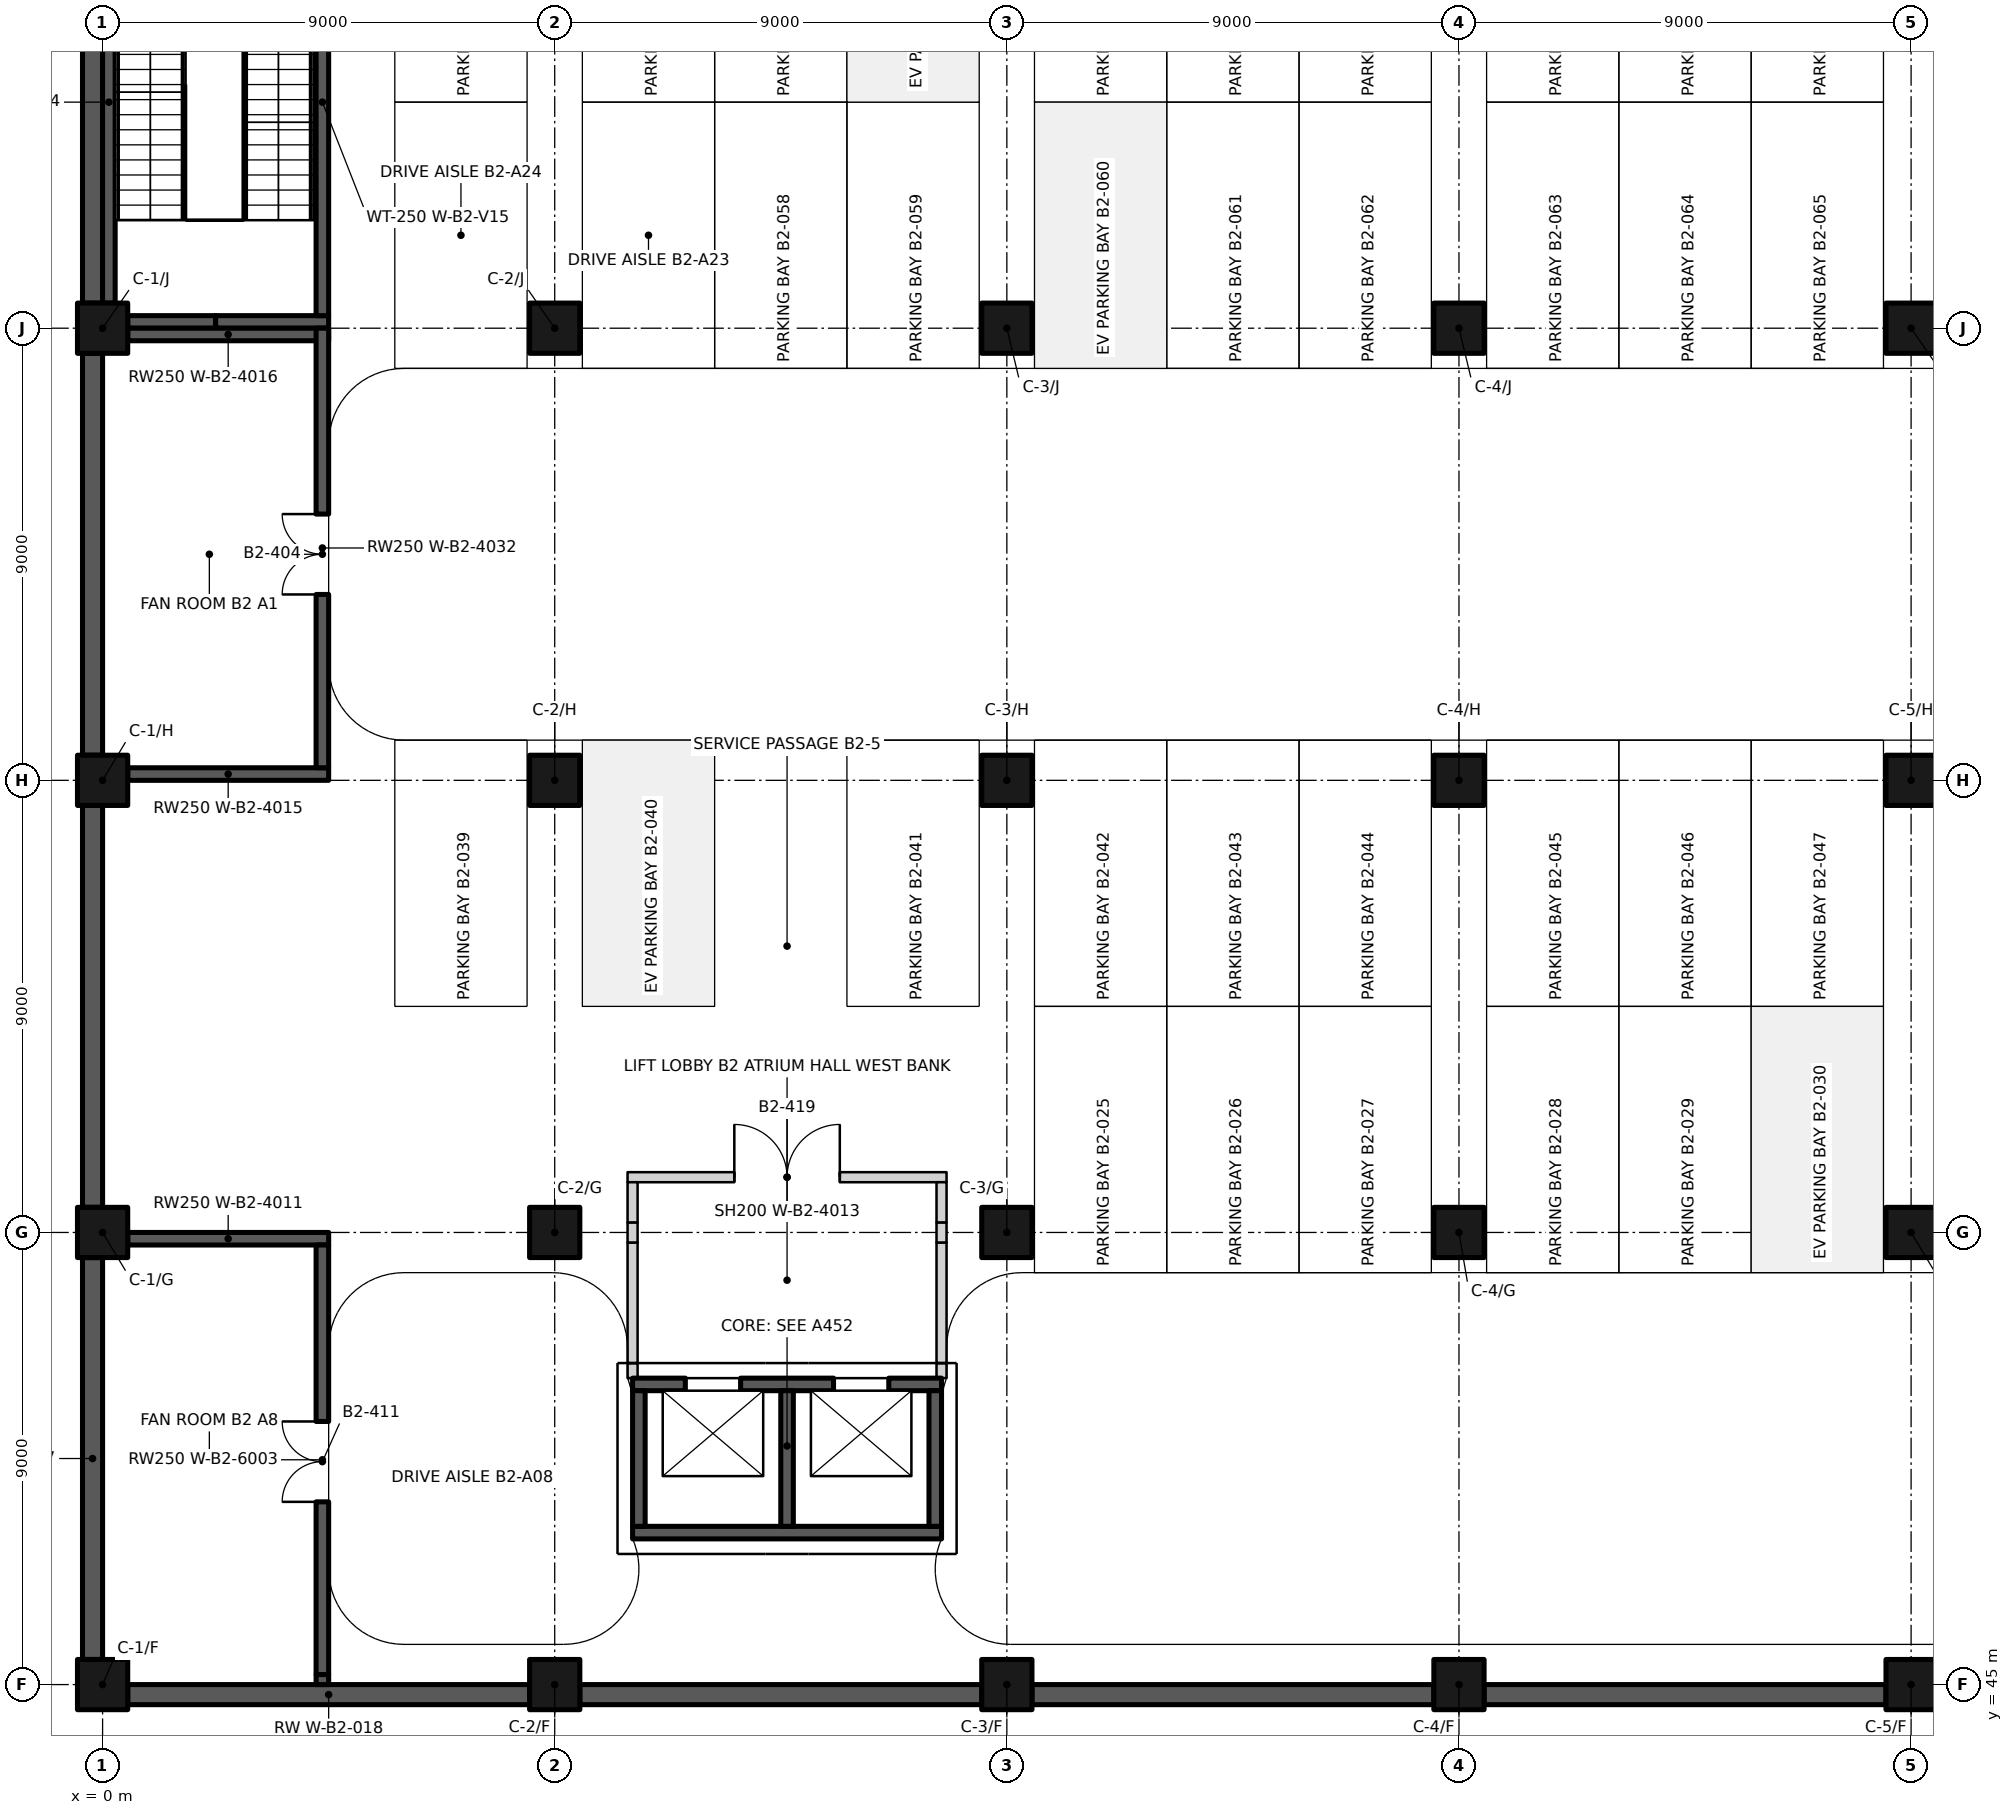
"""IFC4 building model, lengths in metres.
Left out: names, types, materials, properties, quantities, classifications, styles, units other than length and angle.
Written with IfcOpenShell. Run it as: python <this file> out.ifc"""

import sys

from ifc_helpers import new_model, si_unit, direction, frame, frame_2d, origin, origin_2d, place, context, subcontext, project, spatial, rectangle, extrude, element, fill, save


model = new_model("IFC4")
c1 = context("Model", 3, precision=1e-05, world=origin(), true_north=direction((0.0, 1.0)))
c2 = subcontext(c1, "Body", "Model", "MODEL_VIEW")
j1 = project(units=[si_unit("LENGTHUNIT", "METRE"), si_unit("PLANEANGLEUNIT", "RADIAN")], contexts=[c1])
p1 = place(None, origin())
s1 = spatial("IfcSite", under=j1, at=p1, CompositionType="ELEMENT")
p2 = place(p1, origin())
s2 = spatial("IfcBuilding", under=s1, at=p2, CompositionType="ELEMENT")
p3 = place(p2, frame((0.0, 0.0, -9.9)))
s3 = spatial("IfcBuildingStorey", under=s2, at=p3, CompositionType="ELEMENT", Elevation=-9.9)
for number, where, z_axis, x_axis in (
    (1, (0.5, 44.8, -0.5), (0.0, 0.0, 1.0), (1.0, 0.0, 0.0)),
    (2, (9.5, 44.8, -0.5), (0.0, 0.0, 1.0), (1.0, 0.0, 0.0)),
    (3, (18.5, 44.8, -0.5), (0.0, 0.0, 1.0), (1.0, 0.0, 0.0)),
    (4, (27.5, 44.8, -0.5), (0.0, 0.0, 1.0), (1.0, 0.0, 0.0)),
    (5, (-0.2, 45.5, -0.5), (0.0, 0.0, 1.0), (0.0, 1.0, 0.0)),
    (6, (-0.2, 54.5, -0.5), (0.0, 0.0, 1.0), (0.0, 1.0, 0.0)),
    (7, (-0.2, 63.5, -0.5), (0.0, 0.0, 1.0), (0.0, 1.0, 0.0)),
    (8, (-0.2, 72.5, -0.5), (0.0, 0.0, 1.0), (0.0, 1.0, 0.0)),
):
    element("IfcWall", number, at=place(p3, frame(where, z_axis=z_axis, x_axis=x_axis)), inside=s3, PredefinedType="SOLIDWALL", context=c2, shape_type="SweptSolid", body=[
        extrude(rectangle(XDim=8.0, YDim=0.4, at=frame_2d((4.0, 0.0))), origin(), (0.0, 0.0, 1.0), 5.3),
    ])
for number, where, z_axis, x_axis in (
    (9, (0.0, 45.0, 0.0), (0.0, 0.0, 1.0), (1.0, 0.0, 0.0)),
    (10, (9.0, 45.0, 0.0), (0.0, 0.0, 1.0), (1.0, 0.0, 0.0)),
    (11, (18.0, 45.0, 0.0), (0.0, 0.0, 1.0), (1.0, 0.0, 0.0)),
    (12, (27.0, 45.0, 0.0), (0.0, 0.0, 1.0), (1.0, 0.0, 0.0)),
    (13, (36.0, 45.0, 0.0), (0.0, 0.0, 1.0), (1.0, 0.0, 0.0)),
    (14, (0.0, 54.0, 0.0), (0.0, 0.0, 1.0), (1.0, 0.0, 0.0)),
    (15, (9.0, 54.0, 0.0), (0.0, 0.0, 1.0), (1.0, 0.0, 0.0)),
    (16, (18.0, 54.0, 0.0), (0.0, 0.0, 1.0), (1.0, 0.0, 0.0)),
    (17, (27.0, 54.0, 0.0), (0.0, 0.0, 1.0), (1.0, 0.0, 0.0)),
    (18, (36.0, 54.0, 0.0), (0.0, 0.0, 1.0), (1.0, 0.0, 0.0)),
    (19, (0.0, 63.0, 0.0), (0.0, 0.0, 1.0), (1.0, 0.0, 0.0)),
    (20, (9.0, 63.0, 0.0), (0.0, 0.0, 1.0), (1.0, 0.0, 0.0)),
    (21, (18.0, 63.0, 0.0), (0.0, 0.0, 1.0), (1.0, 0.0, 0.0)),
    (22, (27.0, 63.0, 0.0), (0.0, 0.0, 1.0), (1.0, 0.0, 0.0)),
    (23, (36.0, 63.0, 0.0), (0.0, 0.0, 1.0), (1.0, 0.0, 0.0)),
    (24, (0.0, 72.0, 0.0), (0.0, 0.0, 1.0), (1.0, 0.0, 0.0)),
    (25, (9.0, 72.0, 0.0), (0.0, 0.0, 1.0), (1.0, 0.0, 0.0)),
    (26, (18.0, 72.0, 0.0), (0.0, 0.0, 1.0), (1.0, 0.0, 0.0)),
    (27, (27.0, 72.0, 0.0), (0.0, 0.0, 1.0), (1.0, 0.0, 0.0)),
    (28, (36.0, 72.0, 0.0), (0.0, 0.0, 1.0), (1.0, 0.0, 0.0)),
):
    element("IfcColumn", number, at=place(p3, frame(where, z_axis=z_axis, x_axis=x_axis)), inside=s3, PredefinedType="COLUMN", context=c2, shape_type="SweptSolid", body=[
        extrude(rectangle(XDim=1.0, YDim=1.0, at=origin_2d()), origin(), (0.0, 0.0, 1.0), 4.8),
    ])
p4 = place(p3, frame((0.5, 72.125, 0.0), z_axis=(0.0, 0.0, 1.0), x_axis=(1.0, 0.0, 0.0)))
e29 = element("IfcWall", 29, at=p4, inside=s3, PredefinedType="SHEAR", context=c2, shape_type="SweptSolid", body=[
    extrude(rectangle(XDim=1.75, YDim=0.25, at=frame_2d((0.875, 0.0))), origin(), (0.0, 0.0, 1.0), 4.8),
])
p5 = place(p3, frame((2.25, 72.125, 0.0), z_axis=(0.0, 0.0, 1.0), x_axis=(1.0, 0.0, 0.0)))
e30 = element("IfcWall", 30, at=p5, inside=s3, PredefinedType="SHEAR", context=c2, shape_type="SweptSolid", body=[
    extrude(rectangle(XDim=2.25, YDim=0.25, at=frame_2d((1.125, 0.0))), origin(), (0.0, 0.0, 1.0), 4.8),
])
p6 = place(p3, frame((0.125, 72.5, 0.0), z_axis=(0.0, 0.0, 1.0), x_axis=(0.0, 1.0, 0.0)))
e31 = element("IfcWall", 31, at=p6, inside=s3, PredefinedType="SHEAR", context=c2, shape_type="SweptSolid", body=[
    extrude(rectangle(XDim=8.0, YDim=0.25, at=frame_2d((4.0, 0.0))), origin(), (0.0, 0.0, 1.0), 4.8),
])
p7 = place(p3, frame((4.375, 72.25, 0.0), z_axis=(0.0, 0.0, 1.0), x_axis=(0.0, 1.0, 0.0)))
e32 = element("IfcWall", 32, at=p7, inside=s3, PredefinedType="SHEAR", context=c2, shape_type="SweptSolid", body=[
    extrude(rectangle(XDim=8.5, YDim=0.25, at=frame_2d((4.25, 0.0))), origin(), (0.0, 0.0, 1.0), 4.8),
])
p8 = place(p7, frame((8.0, 0.0, 0.0), z_axis=(0.0, 0.0, 1.0), x_axis=(-1.0, 0.0, 0.0)))
e33 = element("IfcOpeningElement", 33, at=p8, cuts=e32, PredefinedType="OPENING", context=c2, shape_type="SweptSolid", body=[
    extrude(rectangle(XDim=1.1, YDim=2.1, at=frame_2d((0.55, 1.05))), frame((0.0, 0.135, 0.0), z_axis=(0.0, -1.0, 0.0), x_axis=(1.0, 0.0, 0.0)), (0.0, 0.0, 1.0), 0.27),
])
p9 = place(p3, frame((10.55, 50.975, -1.6), z_axis=(0.0, 0.0, 1.0), x_axis=(1.0, 0.0, 0.0)))
e34 = element("IfcWall", 34, at=p9, inside=s3, PredefinedType="SHEAR", context=c2, shape_type="SweptSolid", body=[
    extrude(rectangle(XDim=6.15, YDim=0.25, at=frame_2d((3.075, 0.0))), origin(), (0.0, 0.0, 1.0), 6.4),
])
p10 = place(p9, frame((1.05, 0.0, 1.6)))
e35 = element("IfcOpeningElement", 35, at=p10, cuts=e34, PredefinedType="OPENING", context=c2, shape_type="SweptSolid", body=[
    extrude(rectangle(XDim=1.1, YDim=2.1, at=frame_2d((0.55, 1.05))), frame((0.0, 0.135, 0.0), z_axis=(0.0, -1.0, 0.0), x_axis=(1.0, 0.0, 0.0)), (0.0, 0.0, 1.0), 0.27),
])
p11 = place(p9, frame((4.0, 0.0, 1.6)))
e36 = element("IfcOpeningElement", 36, at=p11, cuts=e34, PredefinedType="OPENING", context=c2, shape_type="SweptSolid", body=[
    extrude(rectangle(XDim=1.1, YDim=2.1, at=frame_2d((0.55, 1.05))), frame((0.0, 0.135, 0.0), z_axis=(0.0, -1.0, 0.0), x_axis=(1.0, 0.0, 0.0)), (0.0, 0.0, 1.0), 0.27),
])
p12 = place(p3, frame((10.55, 48.025, -1.6), z_axis=(0.0, 0.0, 1.0), x_axis=(1.0, 0.0, 0.0)))
e37 = element("IfcWall", 37, at=p12, inside=s3, PredefinedType="SHEAR", context=c2, shape_type="SweptSolid", body=[
    extrude(rectangle(XDim=6.15, YDim=0.25, at=frame_2d((3.075, 0.0))), origin(), (0.0, 0.0, 1.0), 6.4),
])
for number, where, z_axis, x_axis in (
    (38, (10.675, 48.15, -1.6), (0.0, 0.0, 1.0), (0.0, 1.0, 0.0)),
    (39, (13.625, 48.15, -1.6), (0.0, 0.0, 1.0), (0.0, 1.0, 0.0)),
    (40, (16.575, 48.15, -1.6), (0.0, 0.0, 1.0), (0.0, 1.0, 0.0)),
):
    element("IfcWall", number, at=place(p3, frame(where, z_axis=z_axis, x_axis=x_axis)), inside=s3, PredefinedType="SHEAR", context=c2, shape_type="SweptSolid", body=[
        extrude(rectangle(XDim=2.7, YDim=0.25, at=frame_2d((1.35, 0.0))), origin(), (0.0, 0.0, 1.0), 6.4),
    ])
p13 = place(p3, frame((0.5, 53.875, 0.0), z_axis=(0.0, 0.0, 1.0), x_axis=(1.0, 0.0, 0.0)))
e41 = element("IfcWall", 41, at=p13, inside=s3, PredefinedType="SOLIDWALL", context=c2, shape_type="SweptSolid", body=[
    extrude(rectangle(XDim=4.0, YDim=0.25, at=frame_2d((2.0, 0.0))), origin(), (0.0, 0.0, 1.0), 4.5),
])
p14 = place(p3, frame((10.45, 55.1, 0.0), z_axis=(0.0, 0.0, 1.0), x_axis=(1.0, 0.0, 0.0)))
e42 = element("IfcWall", 42, at=p14, inside=s3, PredefinedType="PARTITIONING", context=c2, shape_type="SweptSolid", body=[
    extrude(rectangle(XDim=6.35, YDim=0.2, at=frame_2d((3.175, 0.0))), origin(), (0.0, 0.0, 1.0), 4.5),
])
p15 = place(p14, frame((2.125, 0.0, 0.0)))
e43 = element("IfcOpeningElement", 43, at=p15, cuts=e42, PredefinedType="OPENING", context=c2, shape_type="SweptSolid", body=[
    extrude(rectangle(XDim=2.1, YDim=2.4, at=frame_2d((1.05, 1.2))), frame((0.0, 0.11, 0.0), z_axis=(0.0, -1.0, 0.0), x_axis=(1.0, 0.0, 0.0)), (0.0, 0.0, 1.0), 0.22),
])
for number, where, z_axis, x_axis in (
    (44, (0.5, 63.125, 0.0), (0.0, 0.0, 1.0), (1.0, 0.0, 0.0)),
    (45, (0.5, 71.875, 0.0), (0.0, 0.0, 1.0), (1.0, 0.0, 0.0)),
):
    element("IfcWall", number, at=place(p3, frame(where, z_axis=z_axis, x_axis=x_axis)), inside=s3, PredefinedType="SOLIDWALL", context=c2, shape_type="SweptSolid", body=[
        extrude(rectangle(XDim=4.0, YDim=0.25, at=frame_2d((2.0, 0.0))), origin(), (0.0, 0.0, 1.0), 4.5),
    ])
p16 = place(p3, frame((4.375, 45.0, 0.0), z_axis=(0.0, 0.0, 1.0), x_axis=(0.0, 1.0, 0.0)))
e46 = element("IfcWall", 46, at=p16, inside=s3, PredefinedType="SOLIDWALL", context=c2, shape_type="SweptSolid", body=[
    extrude(rectangle(XDim=0.2, YDim=0.25, at=frame_2d((0.1, 0.0))), origin(), (0.0, 0.0, 1.0), 4.0),
])
p17 = place(p3, frame((4.375, 45.2, 0.0), z_axis=(0.0, 0.0, 1.0), x_axis=(0.0, 1.0, 0.0)))
e47 = element("IfcWall", 47, at=p17, inside=s3, PredefinedType="SOLIDWALL", context=c2, shape_type="SweptSolid", body=[
    extrude(rectangle(XDim=8.55, YDim=0.25, at=frame_2d((4.275, 0.0))), origin(), (0.0, 0.0, 1.0), 4.5),
])
p18 = place(p17, frame((3.438, 0.0, 0.0)))
e48 = element("IfcOpeningElement", 48, at=p18, cuts=e47, PredefinedType="OPENING", context=c2, shape_type="SweptSolid", body=[
    extrude(rectangle(XDim=1.6, YDim=2.1, at=frame_2d((0.8, 1.05))), frame((0.0, 0.135, 0.0), z_axis=(0.0, -1.0, 0.0), x_axis=(1.0, 0.0, 0.0)), (0.0, 0.0, 1.0), 0.27),
])
p19 = place(p3, frame((4.375, 63.25, 0.0), z_axis=(0.0, 0.0, 1.0), x_axis=(0.0, 1.0, 0.0)))
e49 = element("IfcWall", 49, at=p19, inside=s3, PredefinedType="SOLIDWALL", context=c2, shape_type="SweptSolid", body=[
    extrude(rectangle(XDim=8.75, YDim=0.25, at=frame_2d((4.375, 0.0))), origin(), (0.0, 0.0, 1.0), 4.5),
])
p20 = place(p19, frame((3.45, 0.0, 0.0)))
e50 = element("IfcOpeningElement", 50, at=p20, cuts=e49, PredefinedType="OPENING", context=c2, shape_type="SweptSolid", body=[
    extrude(rectangle(XDim=1.6, YDim=2.1, at=frame_2d((0.8, 1.05))), frame((0.0, 0.135, 0.0), z_axis=(0.0, -1.0, 0.0), x_axis=(1.0, 0.0, 0.0)), (0.0, 0.0, 1.0), 0.27),
])
p21 = place(p3, frame((10.55, 51.1, 0.0), z_axis=(0.0, 0.0, 1.0), x_axis=(0.0, 1.0, 0.0)))
e51 = element("IfcWall", 51, at=p21, inside=s3, PredefinedType="PARTITIONING", context=c2, shape_type="SweptSolid", body=[
    extrude(rectangle(XDim=0.3, YDim=0.2, at=frame_2d((0.15, 0.0))), origin(), (0.0, 0.0, 1.0), 4.2),
])
p22 = place(p3, frame((10.55, 51.4, 0.0), z_axis=(0.0, 0.0, 1.0), x_axis=(0.0, 1.0, 0.0)))
e52 = element("IfcWall", 52, at=p22, inside=s3, PredefinedType="PARTITIONING", context=c2, shape_type="SweptSolid", body=[
    extrude(rectangle(XDim=2.4, YDim=0.2, at=frame_2d((1.2, 0.0))), origin(), (0.0, 0.0, 1.0), 4.5),
])
p23 = place(p3, frame((10.55, 53.8, 0.0), z_axis=(0.0, 0.0, 1.0), x_axis=(0.0, 1.0, 0.0)))
e53 = element("IfcWall", 53, at=p23, inside=s3, PredefinedType="PARTITIONING", context=c2, shape_type="SweptSolid", body=[
    extrude(rectangle(XDim=0.4, YDim=0.2, at=frame_2d((0.2, 0.0))), origin(), (0.0, 0.0, 1.0), 4.0),
])
p24 = place(p3, frame((10.55, 54.2, 0.0), z_axis=(0.0, 0.0, 1.0), x_axis=(0.0, 1.0, 0.0)))
e54 = element("IfcWall", 54, at=p24, inside=s3, PredefinedType="PARTITIONING", context=c2, shape_type="SweptSolid", body=[
    extrude(rectangle(XDim=0.8, YDim=0.2, at=frame_2d((0.4, 0.0))), origin(), (0.0, 0.0, 1.0), 4.5),
])
p25 = place(p3, frame((16.7, 51.1, 0.0), z_axis=(0.0, 0.0, 1.0), x_axis=(0.0, 1.0, 0.0)))
e55 = element("IfcWall", 55, at=p25, inside=s3, PredefinedType="PARTITIONING", context=c2, shape_type="SweptSolid", body=[
    extrude(rectangle(XDim=0.3, YDim=0.2, at=frame_2d((0.15, 0.0))), origin(), (0.0, 0.0, 1.0), 4.2),
])
p26 = place(p3, frame((16.7, 51.4, 0.0), z_axis=(0.0, 0.0, 1.0), x_axis=(0.0, 1.0, 0.0)))
e56 = element("IfcWall", 56, at=p26, inside=s3, PredefinedType="PARTITIONING", context=c2, shape_type="SweptSolid", body=[
    extrude(rectangle(XDim=2.4, YDim=0.2, at=frame_2d((1.2, 0.0))), origin(), (0.0, 0.0, 1.0), 4.5),
])
p27 = place(p3, frame((16.7, 53.8, 0.0), z_axis=(0.0, 0.0, 1.0), x_axis=(0.0, 1.0, 0.0)))
e57 = element("IfcWall", 57, at=p27, inside=s3, PredefinedType="PARTITIONING", context=c2, shape_type="SweptSolid", body=[
    extrude(rectangle(XDim=0.4, YDim=0.2, at=frame_2d((0.2, 0.0))), origin(), (0.0, 0.0, 1.0), 4.0),
])
p28 = place(p3, frame((16.7, 54.2, 0.0), z_axis=(0.0, 0.0, 1.0), x_axis=(0.0, 1.0, 0.0)))
e58 = element("IfcWall", 58, at=p28, inside=s3, PredefinedType="PARTITIONING", context=c2, shape_type="SweptSolid", body=[
    extrude(rectangle(XDim=0.8, YDim=0.2, at=frame_2d((0.4, 0.0))), origin(), (0.0, 0.0, 1.0), 4.5),
])
p29 = place(p10, origin())
e59 = element("IfcDoor", 59, at=p29, inside=s3, OperationType="DOUBLE_DOOR_SLIDING", PredefinedType="DOOR", context=c2, shape_type="SweptSolid", body=[
    extrude(rectangle(XDim=1.1, YDim=2.1, at=frame_2d((0.55, 1.05))), frame((0.0, 0.025, 0.0), z_axis=(0.0, -1.0, 0.0), x_axis=(1.0, 0.0, 0.0)), (0.0, 0.0, 1.0), 0.05),
])
fill(e35, e59)
p30 = place(p11, origin())
e60 = element("IfcDoor", 60, at=p30, inside=s3, OperationType="DOUBLE_DOOR_SLIDING", PredefinedType="DOOR", context=c2, shape_type="SweptSolid", body=[
    extrude(rectangle(XDim=1.1, YDim=2.1, at=frame_2d((0.55, 1.05))), frame((0.0, 0.025, 0.0), z_axis=(0.0, -1.0, 0.0), x_axis=(1.0, 0.0, 0.0)), (0.0, 0.0, 1.0), 0.05),
])
fill(e36, e60)
p31 = place(p20, origin())
e61 = element("IfcDoor", 61, at=p31, inside=s3, OperationType="DOUBLE_DOOR_SINGLE_SWING", PredefinedType="DOOR", context=c2, shape_type="SweptSolid", body=[
    extrude(rectangle(XDim=1.6, YDim=2.1, at=frame_2d((0.8, 1.05))), frame((0.0, 0.025, 0.0), z_axis=(0.0, -1.0, 0.0), x_axis=(1.0, 0.0, 0.0)), (0.0, 0.0, 1.0), 0.05),
])
fill(e50, e61)
p32 = place(p18, origin())
e62 = element("IfcDoor", 62, at=p32, inside=s3, OperationType="DOUBLE_DOOR_SINGLE_SWING", PredefinedType="DOOR", context=c2, shape_type="SweptSolid", body=[
    extrude(rectangle(XDim=1.6, YDim=2.1, at=frame_2d((0.8, 1.05))), frame((0.0, 0.025, 0.0), z_axis=(0.0, -1.0, 0.0), x_axis=(1.0, 0.0, 0.0)), (0.0, 0.0, 1.0), 0.05),
])
fill(e48, e62)
p33 = place(p15, origin())
e63 = element("IfcDoor", 63, at=p33, inside=s3, OperationType="DOUBLE_DOOR_SINGLE_SWING", PredefinedType="DOOR", context=c2, shape_type="SweptSolid", body=[
    extrude(rectangle(XDim=2.1, YDim=2.4, at=frame_2d((1.05, 1.2))), frame((0.0, 0.025, 0.0), z_axis=(0.0, -1.0, 0.0), x_axis=(1.0, 0.0, 0.0)), (0.0, 0.0, 1.0), 0.05),
])
fill(e43, e63)
save(model, sys.argv[1])
